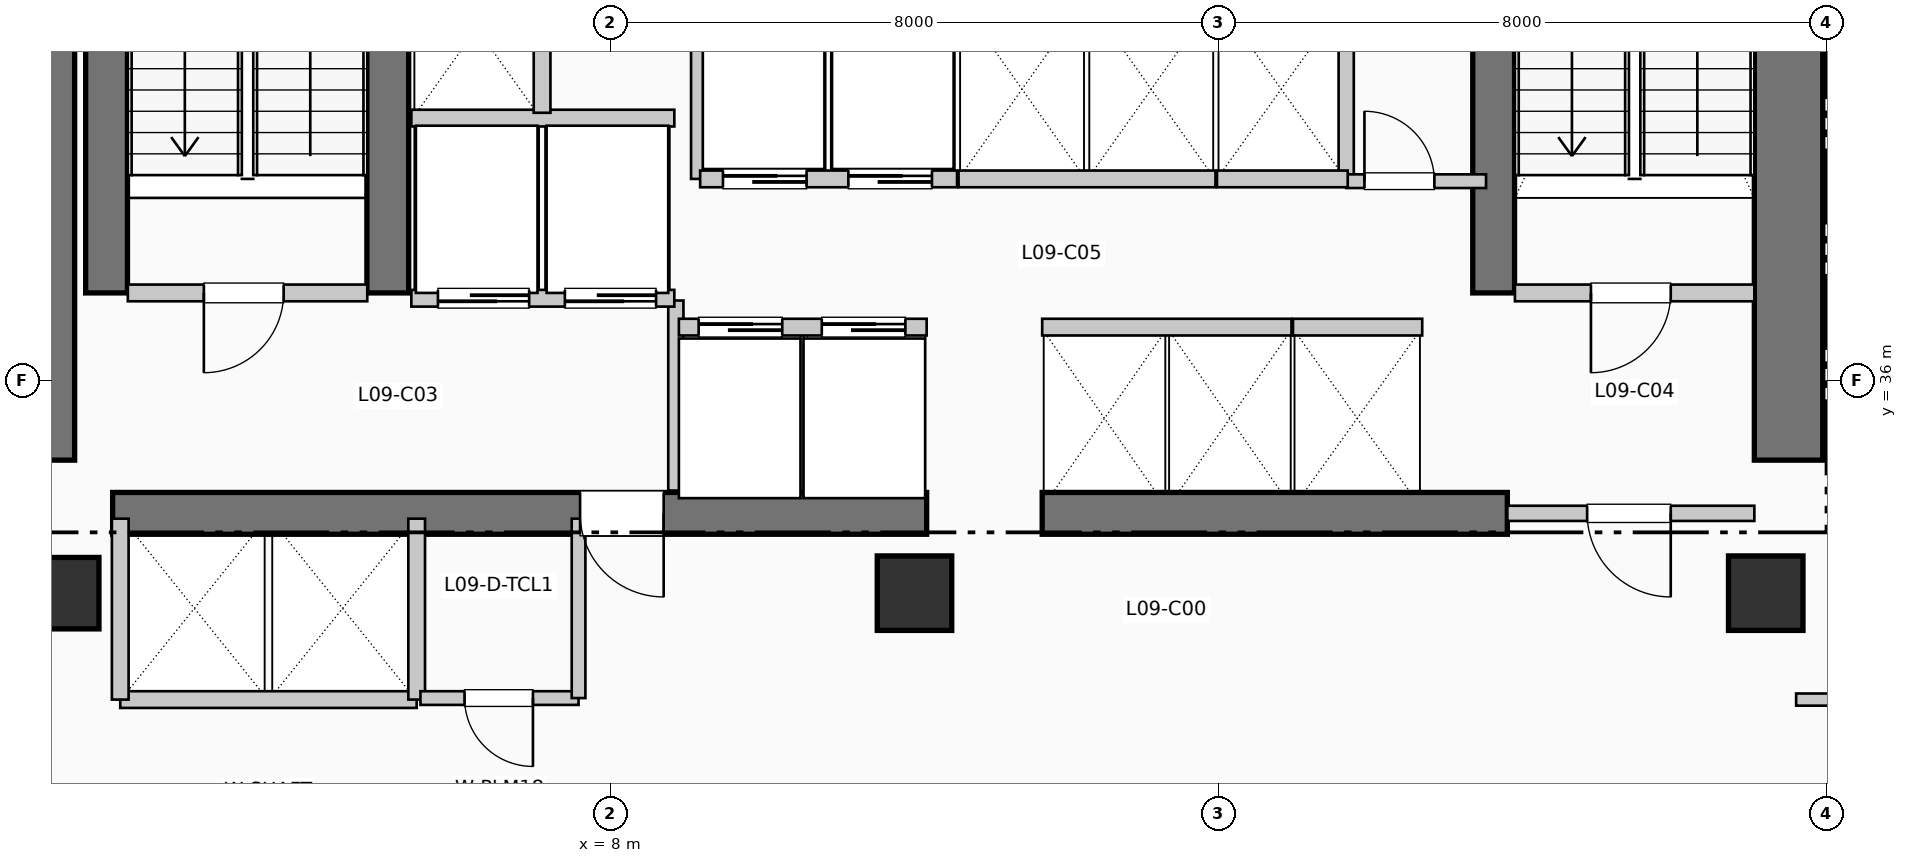
"""IFC4 building model, lengths in metres.
Left out: names, types, materials, properties, quantities, classifications, styles, units other than length and angle.
Written with IfcOpenShell. Run it as: python <this file> out.ifc"""

import sys

from ifc_helpers import new_model, si_unit, direction, frame, frame_2d, origin, origin_2d, place, context, subcontext, project, spatial, rectangle, extrude, element, fill, save


model = new_model("IFC4")
c1 = context("Model", 3, precision=1e-05, world=origin(), true_north=direction((0.0, 1.0)))
c2 = subcontext(c1, "Body", "Model", "MODEL_VIEW")
j1 = project(units=[si_unit("LENGTHUNIT", "METRE"), si_unit("PLANEANGLEUNIT", "RADIAN")], contexts=[c1])
p1 = place(None, origin())
s1 = spatial("IfcSite", under=j1, at=p1, CompositionType="ELEMENT")
p2 = place(p1, origin())
s2 = spatial("IfcBuilding", under=s1, at=p2, CompositionType="ELEMENT")
p3 = place(p2, frame((0.0, 0.0, 42.24)))
s3 = spatial("IfcBuildingStorey", under=s2, at=p3, CompositionType="ELEMENT", Elevation=42.24)
p4 = place(p3, frame((0.5, 34.95, 0.0), z_axis=(0.0, 0.0, 1.0), x_axis=(0.0, 1.0, 0.0)))
e1 = element("IfcWall", 1, at=p4, inside=s3, PredefinedType="SHEAR", context=c2, shape_type="SweptSolid", body=[
    extrude(rectangle(XDim=7.9, YDim=0.9, at=frame_2d((3.95, 0.0))), origin(), (0.0, 0.0, 1.0), 3.96),
])
p5 = place(p3, frame((23.5, 34.95, 0.0), z_axis=(0.0, 0.0, 1.0), x_axis=(0.0, 1.0, 0.0)))
e2 = element("IfcWall", 2, at=p5, inside=s3, PredefinedType="SHEAR", context=c2, shape_type="SweptSolid", body=[
    extrude(rectangle(XDim=10.64, YDim=0.9, at=frame_2d((5.32, 0.0))), origin(), (0.0, 0.0, 1.0), 3.96),
])
p6 = place(p3, frame((1.45, 34.25, 0.0), z_axis=(0.0, 0.0, 1.0), x_axis=(1.0, 0.0, 0.0)))
e3 = element("IfcWall", 3, at=p6, inside=s3, PredefinedType="SHEAR", context=c2, shape_type="SweptSolid", body=[
    extrude(rectangle(XDim=10.71, YDim=0.55, at=frame_2d((5.355, 0.0))), origin(), (0.0, 0.0, 1.0), 3.96),
])
p7 = place(p6, frame((7.25, 0.0, 0.0), z_axis=(0.0, 0.0, 1.0), x_axis=(-1.0, 0.0, 0.0)))
e4 = element("IfcOpeningElement", 4, at=p7, cuts=e3, PredefinedType="OPENING", context=c2, shape_type="SweptSolid", body=[
    extrude(rectangle(XDim=1.1, YDim=2.15, at=frame_2d((0.55, 1.075))), frame((0.0, 0.285, 0.0), z_axis=(0.0, -1.0, 0.0), x_axis=(1.0, 0.0, 0.0)), (0.0, 0.0, 1.0), 0.57),
])
p8 = place(p3, frame((13.68, 34.25, 0.0), z_axis=(0.0, 0.0, 1.0), x_axis=(1.0, 0.0, 0.0)))
e5 = element("IfcWall", 5, at=p8, inside=s3, PredefinedType="SHEAR", context=c2, shape_type="SweptSolid", body=[
    extrude(rectangle(XDim=6.12, YDim=0.55, at=frame_2d((3.06, 0.0))), origin(), (0.0, 0.0, 1.0), 3.96),
])
for number, where, z_axis, x_axis in (
    (6, (1.37, 37.15, 0.0), (0.0, 0.0, 1.0), (0.0, 1.0, 0.0)),
    (7, (5.07, 37.15, 0.0), (0.0, 0.0, 1.0), (0.0, 1.0, 0.0)),
    (8, (19.62, 37.15, 0.0), (0.0, 0.0, 1.0), (0.0, 1.0, 0.0)),
):
    element("IfcWall", number, at=place(p3, frame(where, z_axis=z_axis, x_axis=x_axis)), inside=s3, PredefinedType="SHEAR", context=c2, shape_type="SweptSolid", body=[
        extrude(rectangle(XDim=7.89, YDim=0.55, at=frame_2d((3.945, 0.0))), origin(), (0.0, 0.0, 1.0), 3.96),
    ])
p9 = place(p3, frame((0.8, 33.2, 0.0), z_axis=(0.0, 0.0, 1.0), x_axis=(1.0, 0.0, 0.0)))
e9 = element("IfcColumn", 9, at=p9, inside=s3, PredefinedType="COLUMN", context=c2, shape_type="SweptSolid", body=[
    extrude(rectangle(XDim=0.94, YDim=0.94, at=origin_2d()), origin(), (0.0, 0.0, 1.0), 3.96),
])
for number, where, z_axis, x_axis in (
    (10, (12.0, 33.2, 0.0), (0.0, 0.0, 1.0), (1.0, 0.0, 0.0)),
    (11, (23.2, 33.2, 0.0), (0.0, 0.0, 1.0), (1.0, 0.0, 0.0)),
):
    element("IfcColumn", number, at=place(p3, frame(where, z_axis=z_axis, x_axis=x_axis)), inside=s3, PredefinedType="COLUMN", context=c2, shape_type="SweptSolid", body=[
        extrude(rectangle(XDim=0.98, YDim=0.98, at=origin_2d()), origin(), (0.0, 0.0, 1.0), 3.96),
    ])
p10 = place(p3, frame((1.65, 37.15, 0.0), z_axis=(0.0, 0.0, 1.0), x_axis=(1.0, 0.0, 0.0)))
e12 = element("IfcWall", 12, at=p10, inside=s3, PredefinedType="PARTITIONING", context=c2, shape_type="SweptSolid", body=[
    extrude(rectangle(XDim=3.15, YDim=0.22, at=frame_2d((1.575, 0.0))), origin(), (0.0, 0.0, 1.0), 3.71),
])
p11 = place(p10, frame((2.05, 0.0, 0.0), z_axis=(0.0, 0.0, 1.0), x_axis=(-1.0, 0.0, 0.0)))
e13 = element("IfcOpeningElement", 13, at=p11, cuts=e12, PredefinedType="OPENING", context=c2, shape_type="SweptSolid", body=[
    extrude(rectangle(XDim=1.05, YDim=2.15, at=frame_2d((0.525, 1.075))), frame((0.0, 0.12, 0.0), z_axis=(0.0, -1.0, 0.0), x_axis=(1.0, 0.0, 0.0)), (0.0, 0.0, 1.0), 0.24),
])
p12 = place(p3, frame((8.86, 34.55, 0.0), z_axis=(0.0, 0.0, 1.0), x_axis=(0.0, 1.0, 0.0)))
e14 = element("IfcWall", 14, at=p12, inside=s3, PredefinedType="PARTITIONING", context=c2, shape_type="SweptSolid", body=[
    extrude(rectangle(XDim=2.5, YDim=0.2, at=frame_2d((1.25, 0.0))), origin(), (0.0, 0.0, 1.0), 3.71),
])
p13 = place(p3, frame((19.9, 37.15, 0.0), z_axis=(0.0, 0.0, 1.0), x_axis=(1.0, 0.0, 0.0)))
e15 = element("IfcWall", 15, at=p13, inside=s3, PredefinedType="PARTITIONING", context=c2, shape_type="SweptSolid", body=[
    extrude(rectangle(XDim=3.15, YDim=0.22, at=frame_2d((1.575, 0.0))), origin(), (0.0, 0.0, 1.0), 3.71),
])
p14 = place(p13, frame((2.05, 0.0, 0.0), z_axis=(0.0, 0.0, 1.0), x_axis=(-1.0, 0.0, 0.0)))
e16 = element("IfcOpeningElement", 16, at=p14, cuts=e15, PredefinedType="OPENING", context=c2, shape_type="SweptSolid", body=[
    extrude(rectangle(XDim=1.05, YDim=2.15, at=frame_2d((0.525, 1.075))), frame((0.0, 0.12, 0.0), z_axis=(0.0, -1.0, 0.0), x_axis=(1.0, 0.0, 0.0)), (0.0, 0.0, 1.0), 0.24),
])
p15 = place(p3, frame((19.8, 34.25, 0.0), z_axis=(0.0, 0.0, 1.0), x_axis=(1.0, 0.0, 0.0)))
e17 = element("IfcWall", 17, at=p15, inside=s3, PredefinedType="PARTITIONING", context=c2, shape_type="SweptSolid", body=[
    extrude(rectangle(XDim=3.25, YDim=0.2, at=frame_2d((1.625, 0.0))), origin(), (0.0, 0.0, 1.0), 3.71),
])
p16 = place(p15, frame((2.15, 0.0, 0.0), z_axis=(0.0, 0.0, 1.0), x_axis=(-1.0, 0.0, 0.0)))
e18 = element("IfcOpeningElement", 18, at=p16, cuts=e17, PredefinedType="OPENING", context=c2, shape_type="SweptSolid", body=[
    extrude(rectangle(XDim=1.1, YDim=2.15, at=frame_2d((0.55, 1.075))), frame((0.0, 0.11, 0.0), z_axis=(0.0, -1.0, 0.0), x_axis=(1.0, 0.0, 0.0)), (0.0, 0.0, 1.0), 0.22),
])
p17 = place(p3, frame((5.38, 37.08, 0.0), z_axis=(0.0, 0.0, 1.0), x_axis=(1.0, 0.0, 0.0)))
e19 = element("IfcWall", 19, at=p17, inside=s3, PredefinedType="PARTITIONING", context=c2, shape_type="SweptSolid", body=[
    extrude(rectangle(XDim=3.46, YDim=0.22, at=frame_2d((1.73, 0.0))), origin(), (0.0, 0.0, 1.0), 3.71),
])
p18 = place(p17, frame((1.55, 0.0, 0.0), z_axis=(0.0, 0.0, 1.0), x_axis=(-1.0, 0.0, 0.0)))
e20 = element("IfcOpeningElement", 20, at=p18, cuts=e19, PredefinedType="OPENING", context=c2, shape_type="SweptSolid", body=[
    extrude(rectangle(XDim=1.2, YDim=2.2, at=frame_2d((0.6, 1.1))), frame((0.0, 0.12, 0.0), z_axis=(0.0, -1.0, 0.0), x_axis=(1.0, 0.0, 0.0)), (0.0, 0.0, 1.0), 0.24),
])
p19 = place(p17, frame((3.22, 0.0, 0.0), z_axis=(0.0, 0.0, 1.0), x_axis=(-1.0, 0.0, 0.0)))
e21 = element("IfcOpeningElement", 21, at=p19, cuts=e19, PredefinedType="OPENING", context=c2, shape_type="SweptSolid", body=[
    extrude(rectangle(XDim=1.2, YDim=2.2, at=frame_2d((0.6, 1.1))), frame((0.0, 0.12, 0.0), z_axis=(0.0, -1.0, 0.0), x_axis=(1.0, 0.0, 0.0)), (0.0, 0.0, 1.0), 0.24),
])
p20 = place(p3, frame((5.38, 39.45, 0.0), z_axis=(0.0, 0.0, 1.0), x_axis=(1.0, 0.0, 0.0)))
e22 = element("IfcWall", 22, at=p20, inside=s3, PredefinedType="PARTITIONING", context=c2, shape_type="SweptSolid", body=[
    extrude(rectangle(XDim=3.46, YDim=0.22, at=frame_2d((1.73, 0.0))), origin(), (0.0, 0.0, 1.0), 3.71),
])
p21 = place(p3, frame((7.1, 39.52, 0.0), z_axis=(0.0, 0.0, 1.0), x_axis=(0.0, 1.0, 0.0)))
e23 = element("IfcWall", 23, at=p21, inside=s3, PredefinedType="PARTITIONING", context=c2, shape_type="SweptSolid", body=[
    extrude(rectangle(XDim=2.93, YDim=0.22, at=frame_2d((1.465, 0.0))), origin(), (0.0, 0.0, 1.0), 3.71),
])
p22 = place(p3, frame((1.55, 31.8, 0.0), z_axis=(0.0, 0.0, 1.0), x_axis=(1.0, 0.0, 0.0)))
e24 = element("IfcWall", 24, at=p22, inside=s3, PredefinedType="PARTITIONING", context=c2, shape_type="SweptSolid", body=[
    extrude(rectangle(XDim=3.9, YDim=0.22, at=frame_2d((1.95, 0.0))), origin(), (0.0, 0.0, 1.0), 3.71),
])
for number, where, z_axis, x_axis in (
    (25, (1.55, 31.8, 0.0), (0.0, 0.0, 1.0), (0.0, 1.0, 0.0)),
    (26, (5.45, 31.8, 0.0), (0.0, 0.0, 1.0), (0.0, 1.0, 0.0)),
):
    element("IfcWall", number, at=place(p3, frame(where, z_axis=z_axis, x_axis=x_axis)), inside=s3, PredefinedType="PARTITIONING", context=c2, shape_type="SweptSolid", body=[
        extrude(rectangle(XDim=2.38, YDim=0.22, at=frame_2d((1.19, 0.0))), origin(), (0.0, 0.0, 1.0), 3.71),
    ])
for number, where, z_axis, x_axis in (
    (27, (9.16, 38.65, 0.0), (0.0, 0.0, 1.0), (0.0, 1.0, 0.0)),
    (28, (17.68, 38.65, 0.0), (0.0, 0.0, 1.0), (0.0, 1.0, 0.0)),
):
    element("IfcWall", number, at=place(p3, frame(where, z_axis=z_axis, x_axis=x_axis)), inside=s3, PredefinedType="PARTITIONING", context=c2, shape_type="SweptSolid", body=[
        extrude(rectangle(XDim=2.35, YDim=0.2, at=frame_2d((1.175, 0.0))), origin(), (0.0, 0.0, 1.0), 3.71),
    ])
p23 = place(p3, frame((17.68, 38.62, 0.0), z_axis=(0.0, 0.0, 1.0), x_axis=(1.0, 0.0, 0.0)))
e29 = element("IfcWall", 29, at=p23, inside=s3, PredefinedType="PARTITIONING", context=c2, shape_type="SweptSolid", body=[
    extrude(rectangle(XDim=1.84, YDim=0.18, at=frame_2d((0.92, 0.0))), origin(), (0.0, 0.0, 1.0), 3.71),
])
p24 = place(p23, frame((0.24, 0.0, 0.0)))
e30 = element("IfcOpeningElement", 30, at=p24, cuts=e29, PredefinedType="OPENING", context=c2, shape_type="SweptSolid", body=[
    extrude(rectangle(XDim=0.92, YDim=2.1, at=frame_2d((0.46, 1.05))), frame((0.0, 0.1, 0.0), z_axis=(0.0, -1.0, 0.0), x_axis=(1.0, 0.0, 0.0)), (0.0, 0.0, 1.0), 0.2),
])
p25 = place(p3, frame((5.5, 31.82, 0.0), z_axis=(0.0, 0.0, 1.0), x_axis=(1.0, 0.0, 0.0)))
e31 = element("IfcWall", 31, at=p25, inside=s3, PredefinedType="PLUMBINGWALL", context=c2, shape_type="SweptSolid", body=[
    extrude(rectangle(XDim=2.08, YDim=0.18, at=frame_2d((1.04, 0.0))), origin(), (0.0, 0.0, 1.0), 3.71),
])
p26 = place(p25, frame((1.48, 0.0, 0.0), z_axis=(0.0, 0.0, 1.0), x_axis=(-1.0, 0.0, 0.0)))
e32 = element("IfcOpeningElement", 32, at=p26, cuts=e31, PredefinedType="OPENING", context=c2, shape_type="SweptSolid", body=[
    extrude(rectangle(XDim=0.9, YDim=2.1, at=frame_2d((0.45, 1.05))), frame((0.0, 0.1, 0.0), z_axis=(0.0, -1.0, 0.0), x_axis=(1.0, 0.0, 0.0)), (0.0, 0.0, 1.0), 0.2),
])
p27 = place(p3, frame((7.58, 31.82, 0.0), z_axis=(0.0, 0.0, 1.0), x_axis=(0.0, 1.0, 0.0)))
e33 = element("IfcWall", 33, at=p27, inside=s3, PredefinedType="PLUMBINGWALL", context=c2, shape_type="SweptSolid", body=[
    extrude(rectangle(XDim=2.36, YDim=0.18, at=frame_2d((1.18, 0.0))), origin(), (0.0, 0.0, 1.0), 3.71),
])
p28 = place(p3, frame((8.9, 36.7, 0.0), z_axis=(0.0, 0.0, 1.0), x_axis=(1.0, 0.0, 0.0)))
e34 = element("IfcWall", 34, at=p28, inside=s3, PredefinedType="PARTITIONING", context=c2, shape_type="SweptSolid", body=[
    extrude(rectangle(XDim=3.26, YDim=0.22, at=frame_2d((1.63, 0.0))), origin(), (0.0, 0.0, 1.0), 3.71),
])
p29 = place(p28, frame((0.26, 0.0, 0.0)))
e35 = element("IfcOpeningElement", 35, at=p29, cuts=e34, PredefinedType="OPENING", context=c2, shape_type="SweptSolid", body=[
    extrude(rectangle(XDim=1.1, YDim=2.2, at=frame_2d((0.55, 1.1))), frame((0.0, 0.12, 0.0), z_axis=(0.0, -1.0, 0.0), x_axis=(1.0, 0.0, 0.0)), (0.0, 0.0, 1.0), 0.24),
])
p30 = place(p28, frame((1.88, 0.0, 0.0)))
e36 = element("IfcOpeningElement", 36, at=p30, cuts=e34, PredefinedType="OPENING", context=c2, shape_type="SweptSolid", body=[
    extrude(rectangle(XDim=1.1, YDim=2.2, at=frame_2d((0.55, 1.1))), frame((0.0, 0.12, 0.0), z_axis=(0.0, -1.0, 0.0), x_axis=(1.0, 0.0, 0.0)), (0.0, 0.0, 1.0), 0.24),
])
p31 = place(p3, frame((9.18, 38.65, 0.0), z_axis=(0.0, 0.0, 1.0), x_axis=(1.0, 0.0, 0.0)))
e37 = element("IfcWall", 37, at=p31, inside=s3, PredefinedType="PARTITIONING", context=c2, shape_type="SweptSolid", body=[
    extrude(rectangle(XDim=3.38, YDim=0.22, at=frame_2d((1.69, 0.0))), origin(), (0.0, 0.0, 1.0), 3.71),
])
p32 = place(p31, frame((0.3, 0.0, 0.0)))
e38 = element("IfcOpeningElement", 38, at=p32, cuts=e37, PredefinedType="OPENING", context=c2, shape_type="SweptSolid", body=[
    extrude(rectangle(XDim=1.1, YDim=2.2, at=frame_2d((0.55, 1.1))), frame((0.0, 0.12, 0.0), z_axis=(0.0, -1.0, 0.0), x_axis=(1.0, 0.0, 0.0)), (0.0, 0.0, 1.0), 0.24),
])
p33 = place(p31, frame((1.95, 0.0, 0.0)))
e39 = element("IfcOpeningElement", 39, at=p33, cuts=e37, PredefinedType="OPENING", context=c2, shape_type="SweptSolid", body=[
    extrude(rectangle(XDim=1.1, YDim=2.2, at=frame_2d((0.55, 1.1))), frame((0.0, 0.12, 0.0), z_axis=(0.0, -1.0, 0.0), x_axis=(1.0, 0.0, 0.0)), (0.0, 0.0, 1.0), 0.24),
])
p34 = place(p3, frame((13.68, 36.7, 0.0), z_axis=(0.0, 0.0, 1.0), x_axis=(1.0, 0.0, 0.0)))
e40 = element("IfcWall", 40, at=p34, inside=s3, PredefinedType="PARTITIONING", context=c2, shape_type="SweptSolid", body=[
    extrude(rectangle(XDim=3.28, YDim=0.22, at=frame_2d((1.64, 0.0))), origin(), (0.0, 0.0, 1.0), 3.71),
])
p35 = place(p3, frame((12.58, 38.65, 0.0), z_axis=(0.0, 0.0, 1.0), x_axis=(1.0, 0.0, 0.0)))
e41 = element("IfcWall", 41, at=p35, inside=s3, PredefinedType="PARTITIONING", context=c2, shape_type="SweptSolid", body=[
    extrude(rectangle(XDim=3.38, YDim=0.22, at=frame_2d((1.69, 0.0))), origin(), (0.0, 0.0, 1.0), 3.71),
])
p36 = place(p3, frame((16.98, 36.7, 0.0), z_axis=(0.0, 0.0, 1.0), x_axis=(1.0, 0.0, 0.0)))
e42 = element("IfcWall", 42, at=p36, inside=s3, PredefinedType="PARTITIONING", context=c2, shape_type="SweptSolid", body=[
    extrude(rectangle(XDim=1.7, YDim=0.22, at=frame_2d((0.85, 0.0))), origin(), (0.0, 0.0, 1.0), 3.71),
])
p37 = place(p3, frame((15.98, 38.65, 0.0), z_axis=(0.0, 0.0, 1.0), x_axis=(1.0, 0.0, 0.0)))
e43 = element("IfcWall", 43, at=p37, inside=s3, PredefinedType="PARTITIONING", context=c2, shape_type="SweptSolid", body=[
    extrude(rectangle(XDim=1.72, YDim=0.22, at=frame_2d((0.86, 0.0))), origin(), (0.0, 0.0, 1.0), 3.71),
])
p38 = place(p3, frame((23.6, 31.8, 0.0), z_axis=(0.0, 0.0, 1.0), x_axis=(1.0, 0.0, 0.0)))
e44 = element("IfcWall", 44, at=p38, inside=s3, PredefinedType="PARTITIONING", context=c2, shape_type="SweptSolid", body=[
    extrude(rectangle(XDim=32.21, YDim=0.16, at=frame_2d((16.105, 0.0))), origin(), (0.0, 0.0, 1.0), 3.71),
])
p39 = place(p38, frame((3.712, 0.0, 0.0)))
e45 = element("IfcOpeningElement", 45, at=p39, cuts=e44, PredefinedType="OPENING", context=c2, shape_type="SweptSolid", body=[
    extrude(rectangle(XDim=0.95, YDim=2.15, at=frame_2d((0.475, 1.075))), frame((0.0, 0.09, 0.0), z_axis=(0.0, -1.0, 0.0), x_axis=(1.0, 0.0, 0.0)), (0.0, 0.0, 1.0), 0.18),
])
p40 = place(p38, frame((12.731, 0.0, 0.0)))
e46 = element("IfcOpeningElement", 46, at=p40, cuts=e44, PredefinedType="OPENING", context=c2, shape_type="SweptSolid", body=[
    extrude(rectangle(XDim=0.95, YDim=2.15, at=frame_2d((0.475, 1.075))), frame((0.0, 0.09, 0.0), z_axis=(0.0, -1.0, 0.0), x_axis=(1.0, 0.0, 0.0)), (0.0, 0.0, 1.0), 0.18),
])
p41 = place(p38, frame((21.75, 0.0, 0.0)))
e47 = element("IfcOpeningElement", 47, at=p41, cuts=e44, PredefinedType="OPENING", context=c2, shape_type="SweptSolid", body=[
    extrude(rectangle(XDim=0.95, YDim=2.15, at=frame_2d((0.475, 1.075))), frame((0.0, 0.09, 0.0), z_axis=(0.0, -1.0, 0.0), x_axis=(1.0, 0.0, 0.0)), (0.0, 0.0, 1.0), 0.18),
])
p42 = place(p38, frame((28.836, 0.0, 0.0)))
e48 = element("IfcOpeningElement", 48, at=p42, cuts=e44, PredefinedType="OPENING", context=c2, shape_type="SweptSolid", body=[
    extrude(rectangle(XDim=0.95, YDim=2.15, at=frame_2d((0.475, 1.075))), frame((0.0, 0.09, 0.0), z_axis=(0.0, -1.0, 0.0), x_axis=(1.0, 0.0, 0.0)), (0.0, 0.0, 1.0), 0.18),
])
p43 = place(p11, origin())
e49 = element("IfcDoor", 49, at=p43, inside=s3, OperationType="SINGLE_SWING_LEFT", PredefinedType="DOOR", context=c2, shape_type="SweptSolid", body=[
    extrude(rectangle(XDim=1.05, YDim=2.15, at=frame_2d((0.525, 1.075))), frame((0.0, 0.025, 0.0), z_axis=(0.0, -1.0, 0.0), x_axis=(1.0, 0.0, 0.0)), (0.0, 0.0, 1.0), 0.05),
])
fill(e13, e49)
p44 = place(p7, origin())
e50 = element("IfcDoor", 50, at=p44, inside=s3, OperationType="SINGLE_SWING_RIGHT", PredefinedType="DOOR", context=c2, shape_type="SweptSolid", body=[
    extrude(rectangle(XDim=1.1, YDim=2.15, at=frame_2d((0.55, 1.075))), frame((0.0, 0.025, 0.0), z_axis=(0.0, -1.0, 0.0), x_axis=(1.0, 0.0, 0.0)), (0.0, 0.0, 1.0), 0.05),
])
fill(e4, e50)
p45 = place(p14, origin())
e51 = element("IfcDoor", 51, at=p45, inside=s3, OperationType="SINGLE_SWING_LEFT", PredefinedType="DOOR", context=c2, shape_type="SweptSolid", body=[
    extrude(rectangle(XDim=1.05, YDim=2.15, at=frame_2d((0.525, 1.075))), frame((0.0, 0.025, 0.0), z_axis=(0.0, -1.0, 0.0), x_axis=(1.0, 0.0, 0.0)), (0.0, 0.0, 1.0), 0.05),
])
fill(e16, e51)
p46 = place(p16, origin())
e52 = element("IfcDoor", 52, at=p46, inside=s3, OperationType="SINGLE_SWING_RIGHT", PredefinedType="DOOR", context=c2, shape_type="SweptSolid", body=[
    extrude(rectangle(XDim=1.1, YDim=2.15, at=frame_2d((0.55, 1.075))), frame((0.0, 0.025, 0.0), z_axis=(0.0, -1.0, 0.0), x_axis=(1.0, 0.0, 0.0)), (0.0, 0.0, 1.0), 0.05),
])
fill(e18, e52)
p47 = place(p18, origin())
e53 = element("IfcDoor", 53, at=p47, inside=s3, OperationType="SLIDING_TO_RIGHT", PredefinedType="DOOR", context=c2, shape_type="SweptSolid", body=[
    extrude(rectangle(XDim=1.2, YDim=2.2, at=frame_2d((0.6, 1.1))), frame((0.0, 0.025, 0.0), z_axis=(0.0, -1.0, 0.0), x_axis=(1.0, 0.0, 0.0)), (0.0, 0.0, 1.0), 0.05),
])
fill(e20, e53)
p48 = place(p19, origin())
e54 = element("IfcDoor", 54, at=p48, inside=s3, OperationType="SLIDING_TO_RIGHT", PredefinedType="DOOR", context=c2, shape_type="SweptSolid", body=[
    extrude(rectangle(XDim=1.2, YDim=2.2, at=frame_2d((0.6, 1.1))), frame((0.0, 0.025, 0.0), z_axis=(0.0, -1.0, 0.0), x_axis=(1.0, 0.0, 0.0)), (0.0, 0.0, 1.0), 0.05),
])
fill(e21, e54)
p49 = place(p24, origin())
e55 = element("IfcDoor", 55, at=p49, inside=s3, OperationType="SINGLE_SWING_LEFT", PredefinedType="DOOR", context=c2, shape_type="SweptSolid", body=[
    extrude(rectangle(XDim=0.92, YDim=2.1, at=frame_2d((0.46, 1.05))), frame((0.0, 0.025, 0.0), z_axis=(0.0, -1.0, 0.0), x_axis=(1.0, 0.0, 0.0)), (0.0, 0.0, 1.0), 0.05),
])
fill(e30, e55)
p50 = place(p26, origin())
e56 = element("IfcDoor", 56, at=p50, inside=s3, OperationType="SINGLE_SWING_RIGHT", PredefinedType="DOOR", context=c2, shape_type="SweptSolid", body=[
    extrude(rectangle(XDim=0.9, YDim=2.1, at=frame_2d((0.45, 1.05))), frame((0.0, 0.025, 0.0), z_axis=(0.0, -1.0, 0.0), x_axis=(1.0, 0.0, 0.0)), (0.0, 0.0, 1.0), 0.05),
])
fill(e32, e56)
p51 = place(p29, origin())
e57 = element("IfcDoor", 57, at=p51, inside=s3, OperationType="SLIDING_TO_LEFT", PredefinedType="DOOR", context=c2, shape_type="SweptSolid", body=[
    extrude(rectangle(XDim=1.1, YDim=2.2, at=frame_2d((0.55, 1.1))), frame((0.0, 0.025, 0.0), z_axis=(0.0, -1.0, 0.0), x_axis=(1.0, 0.0, 0.0)), (0.0, 0.0, 1.0), 0.05),
])
fill(e35, e57)
p52 = place(p30, origin())
e58 = element("IfcDoor", 58, at=p52, inside=s3, OperationType="SLIDING_TO_LEFT", PredefinedType="DOOR", context=c2, shape_type="SweptSolid", body=[
    extrude(rectangle(XDim=1.1, YDim=2.2, at=frame_2d((0.55, 1.1))), frame((0.0, 0.025, 0.0), z_axis=(0.0, -1.0, 0.0), x_axis=(1.0, 0.0, 0.0)), (0.0, 0.0, 1.0), 0.05),
])
fill(e36, e58)
p53 = place(p32, origin())
e59 = element("IfcDoor", 59, at=p53, inside=s3, OperationType="SLIDING_TO_LEFT", PredefinedType="DOOR", context=c2, shape_type="SweptSolid", body=[
    extrude(rectangle(XDim=1.1, YDim=2.2, at=frame_2d((0.55, 1.1))), frame((0.0, 0.025, 0.0), z_axis=(0.0, -1.0, 0.0), x_axis=(1.0, 0.0, 0.0)), (0.0, 0.0, 1.0), 0.05),
])
fill(e38, e59)
p54 = place(p33, origin())
e60 = element("IfcDoor", 60, at=p54, inside=s3, OperationType="SLIDING_TO_LEFT", PredefinedType="DOOR", context=c2, shape_type="SweptSolid", body=[
    extrude(rectangle(XDim=1.1, YDim=2.2, at=frame_2d((0.55, 1.1))), frame((0.0, 0.025, 0.0), z_axis=(0.0, -1.0, 0.0), x_axis=(1.0, 0.0, 0.0)), (0.0, 0.0, 1.0), 0.05),
])
fill(e39, e60)
save(model, sys.argv[1])
